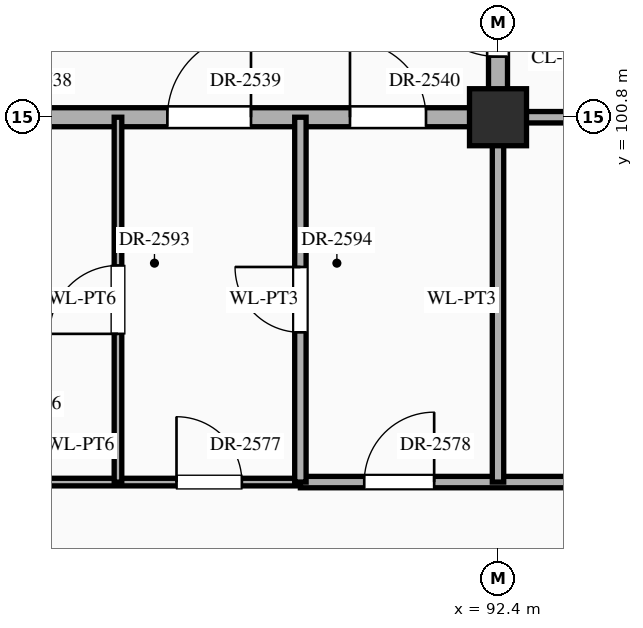
"""IFC4 building model, lengths in metres.
Left out: names, types, materials, properties, quantities, classifications, styles, units other than length and angle.
Written with IfcOpenShell. Run it as: python <this file> out.ifc"""

import sys

from ifc_helpers import new_model, si_unit, direction, frame, frame_2d, origin, origin_2d, place, context, subcontext, project, spatial, rectangle, extrude, element, fill, save


model = new_model("IFC4")
c1 = context("Model", 3, precision=1e-05, world=origin(), true_north=direction((0.0, 1.0)))
c2 = subcontext(c1, "Body", "Model", "MODEL_VIEW")
j1 = project(units=[si_unit("LENGTHUNIT", "METRE"), si_unit("PLANEANGLEUNIT", "RADIAN")], contexts=[c1])
p1 = place(None, origin())
s1 = spatial("IfcSite", under=j1, at=p1, CompositionType="ELEMENT")
p2 = place(p1, origin())
s2 = spatial("IfcBuilding", under=s1, at=p2, CompositionType="ELEMENT")
p3 = place(p2, frame((0.0, 0.0, 35.1)))
s3 = spatial("IfcBuildingStorey", under=s2, at=p3, CompositionType="ELEMENT", Elevation=35.1)
p4 = place(p3, frame((92.4, 100.8, 0.0), z_axis=(0.0, 0.0, 1.0), x_axis=(1.0, 0.0, 0.0)))
e1 = element("IfcColumn", 1, at=p4, inside=s3, PredefinedType="COLUMN", context=c2, shape_type="SweptSolid", body=[
    extrude(rectangle(XDim=0.75, YDim=0.75, at=origin_2d()), origin(), (0.0, 0.0, 1.0), 4.2),
])
p5 = place(p3, frame((84.0, 96.0, 0.0), z_axis=(0.0, 0.0, 1.0), x_axis=(1.0, 0.0, 0.0)))
e2 = element("IfcWall", 2, at=p5, inside=s3, PredefinedType="STANDARD", context=c2, shape_type="SweptSolid", body=[
    extrude(rectangle(XDim=5.8, YDim=0.1, at=frame_2d((2.9, 0.0))), origin(), (0.0, 0.0, 1.0), 3.95),
])
p6 = place(p5, frame((1.25, 0.0, 0.0)))
e3 = element("IfcOpeningElement", 3, at=p6, cuts=e2, PredefinedType="OPENING", context=c2, shape_type="SweptSolid", body=[
    extrude(rectangle(XDim=0.9, YDim=2.15, at=frame_2d((0.45, 1.075))), frame((0.0, 0.062, 0.0), z_axis=(0.0, -1.0, 0.0), x_axis=(1.0, 0.0, 0.0)), (0.0, 0.0, 1.0), 0.124),
])
p7 = place(p5, frame((4.17, 0.0, 0.0)))
e4 = element("IfcOpeningElement", 4, at=p7, cuts=e2, PredefinedType="OPENING", context=c2, shape_type="SweptSolid", body=[
    extrude(rectangle(XDim=0.86, YDim=2.1, at=frame_2d((0.43, 1.05))), frame((0.0, 0.062, 0.0), z_axis=(0.0, -1.0, 0.0), x_axis=(1.0, 0.0, 0.0)), (0.0, 0.0, 1.0), 0.124),
])
p8 = place(p3, frame((89.8, 96.0, 0.0), z_axis=(0.0, 0.0, 1.0), x_axis=(1.0, 0.0, 0.0)))
e5 = element("IfcWall", 5, at=p8, inside=s3, PredefinedType="STANDARD", context=c2, shape_type="SweptSolid", body=[
    extrude(rectangle(XDim=19.4, YDim=0.15, at=frame_2d((9.7, 0.0))), origin(), (0.0, 0.0, 1.0), 3.95),
])
p9 = place(p8, frame((0.84, 0.0, 0.0)))
e6 = element("IfcOpeningElement", 6, at=p9, cuts=e5, PredefinedType="OPENING", context=c2, shape_type="SweptSolid", body=[
    extrude(rectangle(XDim=0.92, YDim=2.15, at=frame_2d((0.46, 1.075))), frame((0.0, 0.087, 0.0), z_axis=(0.0, -1.0, 0.0), x_axis=(1.0, 0.0, 0.0)), (0.0, 0.0, 1.0), 0.174),
])
p10 = place(p8, frame((6.32, 0.0, 0.0)))
e7 = element("IfcOpeningElement", 7, at=p10, cuts=e5, PredefinedType="OPENING", context=c2, shape_type="SweptSolid", body=[
    extrude(rectangle(XDim=0.96, YDim=2.2, at=frame_2d((0.48, 1.1))), frame((0.0, 0.087, 0.0), z_axis=(0.0, -1.0, 0.0), x_axis=(1.0, 0.0, 0.0)), (0.0, 0.0, 1.0), 0.174),
])
p11 = place(p8, frame((14.7, 0.0, 0.0)))
e8 = element("IfcOpeningElement", 8, at=p11, cuts=e5, PredefinedType="OPENING", context=c2, shape_type="SweptSolid", body=[
    extrude(rectangle(XDim=1.0, YDim=2.25, at=frame_2d((0.5, 1.125))), frame((0.0, 0.087, 0.0), z_axis=(0.0, -1.0, 0.0), x_axis=(1.0, 0.0, 0.0)), (0.0, 0.0, 1.0), 0.174),
])
p12 = place(p3, frame((75.6, 100.8, 0.0), z_axis=(0.0, 0.0, 1.0), x_axis=(1.0, 0.0, 0.0)))
e9 = element("IfcWall", 9, at=p12, inside=s3, PredefinedType="STANDARD", context=c2, shape_type="SweptSolid", body=[
    extrude(rectangle(XDim=16.8, YDim=0.25, at=frame_2d((8.4, 0.0))), origin(), (0.0, 0.0, 1.0), 3.1),
])
p13 = place(p12, frame((3.65, 0.0, 0.0)))
e10 = element("IfcOpeningElement", 10, at=p13, cuts=e9, PredefinedType="OPENING", context=c2, shape_type="SweptSolid", body=[
    extrude(rectangle(XDim=1.1, YDim=2.2, at=frame_2d((0.55, 1.1))), frame((0.0, 0.137, 0.0), z_axis=(0.0, -1.0, 0.0), x_axis=(1.0, 0.0, 0.0)), (0.0, 0.0, 1.0), 0.274),
])
p14 = place(p12, frame((9.772, 0.0, 0.0)))
e11 = element("IfcOpeningElement", 11, at=p14, cuts=e9, PredefinedType="OPENING", context=c2, shape_type="SweptSolid", body=[
    extrude(rectangle(XDim=0.95, YDim=2.15, at=frame_2d((0.475, 1.075))), frame((0.0, 0.137, 0.0), z_axis=(0.0, -1.0, 0.0), x_axis=(1.0, 0.0, 0.0)), (0.0, 0.0, 1.0), 0.274),
])
p15 = place(p12, frame((12.45, 0.0, 0.0)))
e12 = element("IfcOpeningElement", 12, at=p15, cuts=e9, PredefinedType="OPENING", context=c2, shape_type="SweptSolid", body=[
    extrude(rectangle(XDim=1.1, YDim=2.2, at=frame_2d((0.55, 1.1))), frame((0.0, 0.137, 0.0), z_axis=(0.0, -1.0, 0.0), x_axis=(1.0, 0.0, 0.0)), (0.0, 0.0, 1.0), 0.274),
])
p16 = place(p12, frame((14.853, 0.0, 0.0)))
e13 = element("IfcOpeningElement", 13, at=p16, cuts=e9, PredefinedType="OPENING", context=c2, shape_type="SweptSolid", body=[
    extrude(rectangle(XDim=1.0, YDim=2.2, at=frame_2d((0.5, 1.1))), frame((0.0, 0.137, 0.0), z_axis=(0.0, -1.0, 0.0), x_axis=(1.0, 0.0, 0.0)), (0.0, 0.0, 1.0), 0.274),
])
p17 = place(p3, frame((92.4, 100.8, 0.0), z_axis=(0.0, 0.0, 1.0), x_axis=(1.0, 0.0, 0.0)))
e14 = element("IfcWall", 14, at=p17, inside=s3, PredefinedType="STANDARD", context=c2, shape_type="SweptSolid", body=[
    extrude(rectangle(XDim=4.2, YDim=0.15, at=frame_2d((2.1, 0.0))), origin(), (0.0, 0.0, 1.0), 3.1),
])
p18 = place(p17, frame((1.798, 0.0, 0.0)))
e15 = element("IfcOpeningElement", 15, at=p18, cuts=e14, PredefinedType="OPENING", context=c2, shape_type="SweptSolid", body=[
    extrude(rectangle(XDim=0.9, YDim=2.15, at=frame_2d((0.45, 1.075))), frame((0.0, 0.087, 0.0), z_axis=(0.0, -1.0, 0.0), x_axis=(1.0, 0.0, 0.0)), (0.0, 0.0, 1.0), 0.174),
])
p19 = place(p3, frame((87.4, 96.0, 0.0), z_axis=(0.0, 0.0, 1.0), x_axis=(0.0, 1.0, 0.0)))
e16 = element("IfcWall", 16, at=p19, inside=s3, PredefinedType="STANDARD", context=c2, shape_type="SweptSolid", body=[
    extrude(rectangle(XDim=4.8, YDim=0.1, at=frame_2d((2.4, 0.0))), origin(), (0.0, 0.0, 1.0), 3.95),
])
p20 = place(p19, frame((1.95, 0.0, 0.0)))
e17 = element("IfcOpeningElement", 17, at=p20, cuts=e16, PredefinedType="OPENING", context=c2, shape_type="SweptSolid", body=[
    extrude(rectangle(XDim=0.9, YDim=2.15, at=frame_2d((0.45, 1.075))), frame((0.0, 0.062, 0.0), z_axis=(0.0, -1.0, 0.0), x_axis=(1.0, 0.0, 0.0)), (0.0, 0.0, 1.0), 0.124),
])
p21 = place(p3, frame((89.8, 96.0, 0.0), z_axis=(0.0, 0.0, 1.0), x_axis=(0.0, 1.0, 0.0)))
e18 = element("IfcWall", 18, at=p21, inside=s3, PredefinedType="STANDARD", context=c2, shape_type="SweptSolid", body=[
    extrude(rectangle(XDim=4.8, YDim=0.15, at=frame_2d((2.4, 0.0))), origin(), (0.0, 0.0, 1.0), 3.95),
])
p22 = place(p21, frame((1.97, 0.0, 0.0)))
e19 = element("IfcOpeningElement", 19, at=p22, cuts=e18, PredefinedType="OPENING", context=c2, shape_type="SweptSolid", body=[
    extrude(rectangle(XDim=0.86, YDim=2.1, at=frame_2d((0.43, 1.05))), frame((0.0, 0.087, 0.0), z_axis=(0.0, -1.0, 0.0), x_axis=(1.0, 0.0, 0.0)), (0.0, 0.0, 1.0), 0.174),
])
p23 = place(p3, frame((92.4, 96.0, 0.0), z_axis=(0.0, 0.0, 1.0), x_axis=(0.0, 1.0, 0.0)))
e20 = element("IfcWall", 20, at=p23, inside=s3, PredefinedType="STANDARD", context=c2, shape_type="SweptSolid", body=[
    extrude(rectangle(XDim=4.8, YDim=0.15, at=frame_2d((2.4, 0.0))), origin(), (0.0, 0.0, 1.0), 3.2),
])
p24 = place(p3, frame((92.4, 100.8, 0.0), z_axis=(0.0, 0.0, 1.0), x_axis=(0.0, 1.0, 0.0)))
e21 = element("IfcWall", 21, at=p24, inside=s3, PredefinedType="STANDARD", context=c2, shape_type="SweptSolid", body=[
    extrude(rectangle(XDim=3.6, YDim=0.25, at=frame_2d((1.8, 0.0))), origin(), (0.0, 0.0, 1.0), 3.2),
])
p25 = place(p24, frame((0.798, 0.0, 0.0)))
e22 = element("IfcOpeningElement", 22, at=p25, cuts=e21, PredefinedType="OPENING", context=c2, shape_type="SweptSolid", body=[
    extrude(rectangle(XDim=1.1, YDim=2.2, at=frame_2d((0.55, 1.1))), frame((0.0, 0.137, 0.0), z_axis=(0.0, -1.0, 0.0), x_axis=(1.0, 0.0, 0.0)), (0.0, 0.0, 1.0), 0.274),
])
p26 = place(p25, origin())
e23 = element("IfcDoor", 23, at=p26, inside=s3, OperationType="SINGLE_SWING_RIGHT", PredefinedType="DOOR", context=c2, shape_type="SweptSolid", body=[
    extrude(rectangle(XDim=1.1, YDim=2.2, at=frame_2d((0.55, 1.1))), frame((0.0, 0.025, 0.0), z_axis=(0.0, -1.0, 0.0), x_axis=(1.0, 0.0, 0.0)), (0.0, 0.0, 1.0), 0.05),
])
fill(e22, e23)
p27 = place(p15, origin())
e24 = element("IfcDoor", 24, at=p27, inside=s3, OperationType="SINGLE_SWING_RIGHT", PredefinedType="DOOR", context=c2, shape_type="SweptSolid", body=[
    extrude(rectangle(XDim=1.1, YDim=2.2, at=frame_2d((0.55, 1.1))), frame((0.0, 0.025, 0.0), z_axis=(0.0, -1.0, 0.0), x_axis=(1.0, 0.0, 0.0)), (0.0, 0.0, 1.0), 0.05),
])
fill(e12, e24)
p28 = place(p16, origin())
e25 = element("IfcDoor", 25, at=p28, inside=s3, OperationType="SINGLE_SWING_LEFT", PredefinedType="DOOR", context=c2, shape_type="SweptSolid", body=[
    extrude(rectangle(XDim=1.0, YDim=2.2, at=frame_2d((0.5, 1.1))), frame((0.0, 0.025, 0.0), z_axis=(0.0, -1.0, 0.0), x_axis=(1.0, 0.0, 0.0)), (0.0, 0.0, 1.0), 0.05),
])
fill(e13, e25)
p29 = place(p7, origin())
e26 = element("IfcDoor", 26, at=p29, inside=s3, OperationType="SINGLE_SWING_LEFT", PredefinedType="DOOR", context=c2, shape_type="SweptSolid", body=[
    extrude(rectangle(XDim=0.86, YDim=2.1, at=frame_2d((0.43, 1.05))), frame((0.0, 0.025, 0.0), z_axis=(0.0, -1.0, 0.0), x_axis=(1.0, 0.0, 0.0)), (0.0, 0.0, 1.0), 0.05),
])
fill(e4, e26)
p30 = place(p9, origin())
e27 = element("IfcDoor", 27, at=p30, inside=s3, OperationType="SINGLE_SWING_RIGHT", PredefinedType="DOOR", context=c2, shape_type="SweptSolid", body=[
    extrude(rectangle(XDim=0.92, YDim=2.15, at=frame_2d((0.46, 1.075))), frame((0.0, 0.025, 0.0), z_axis=(0.0, -1.0, 0.0), x_axis=(1.0, 0.0, 0.0)), (0.0, 0.0, 1.0), 0.05),
])
fill(e6, e27)
p31 = place(p20, origin())
e28 = element("IfcDoor", 28, at=p31, inside=s3, OperationType="SINGLE_SWING_LEFT", PredefinedType="DOOR", context=c2, shape_type="SweptSolid", body=[
    extrude(rectangle(XDim=0.9, YDim=2.15, at=frame_2d((0.45, 1.075))), frame((0.0, 0.025, 0.0), z_axis=(0.0, -1.0, 0.0), x_axis=(1.0, 0.0, 0.0)), (0.0, 0.0, 1.0), 0.05),
])
fill(e17, e28)
p32 = place(p22, origin())
e29 = element("IfcDoor", 29, at=p32, inside=s3, OperationType="SINGLE_SWING_RIGHT", PredefinedType="DOOR", context=c2, shape_type="SweptSolid", body=[
    extrude(rectangle(XDim=0.86, YDim=2.1, at=frame_2d((0.43, 1.05))), frame((0.0, 0.025, 0.0), z_axis=(0.0, -1.0, 0.0), x_axis=(1.0, 0.0, 0.0)), (0.0, 0.0, 1.0), 0.05),
])
fill(e19, e29)
save(model, sys.argv[1])
